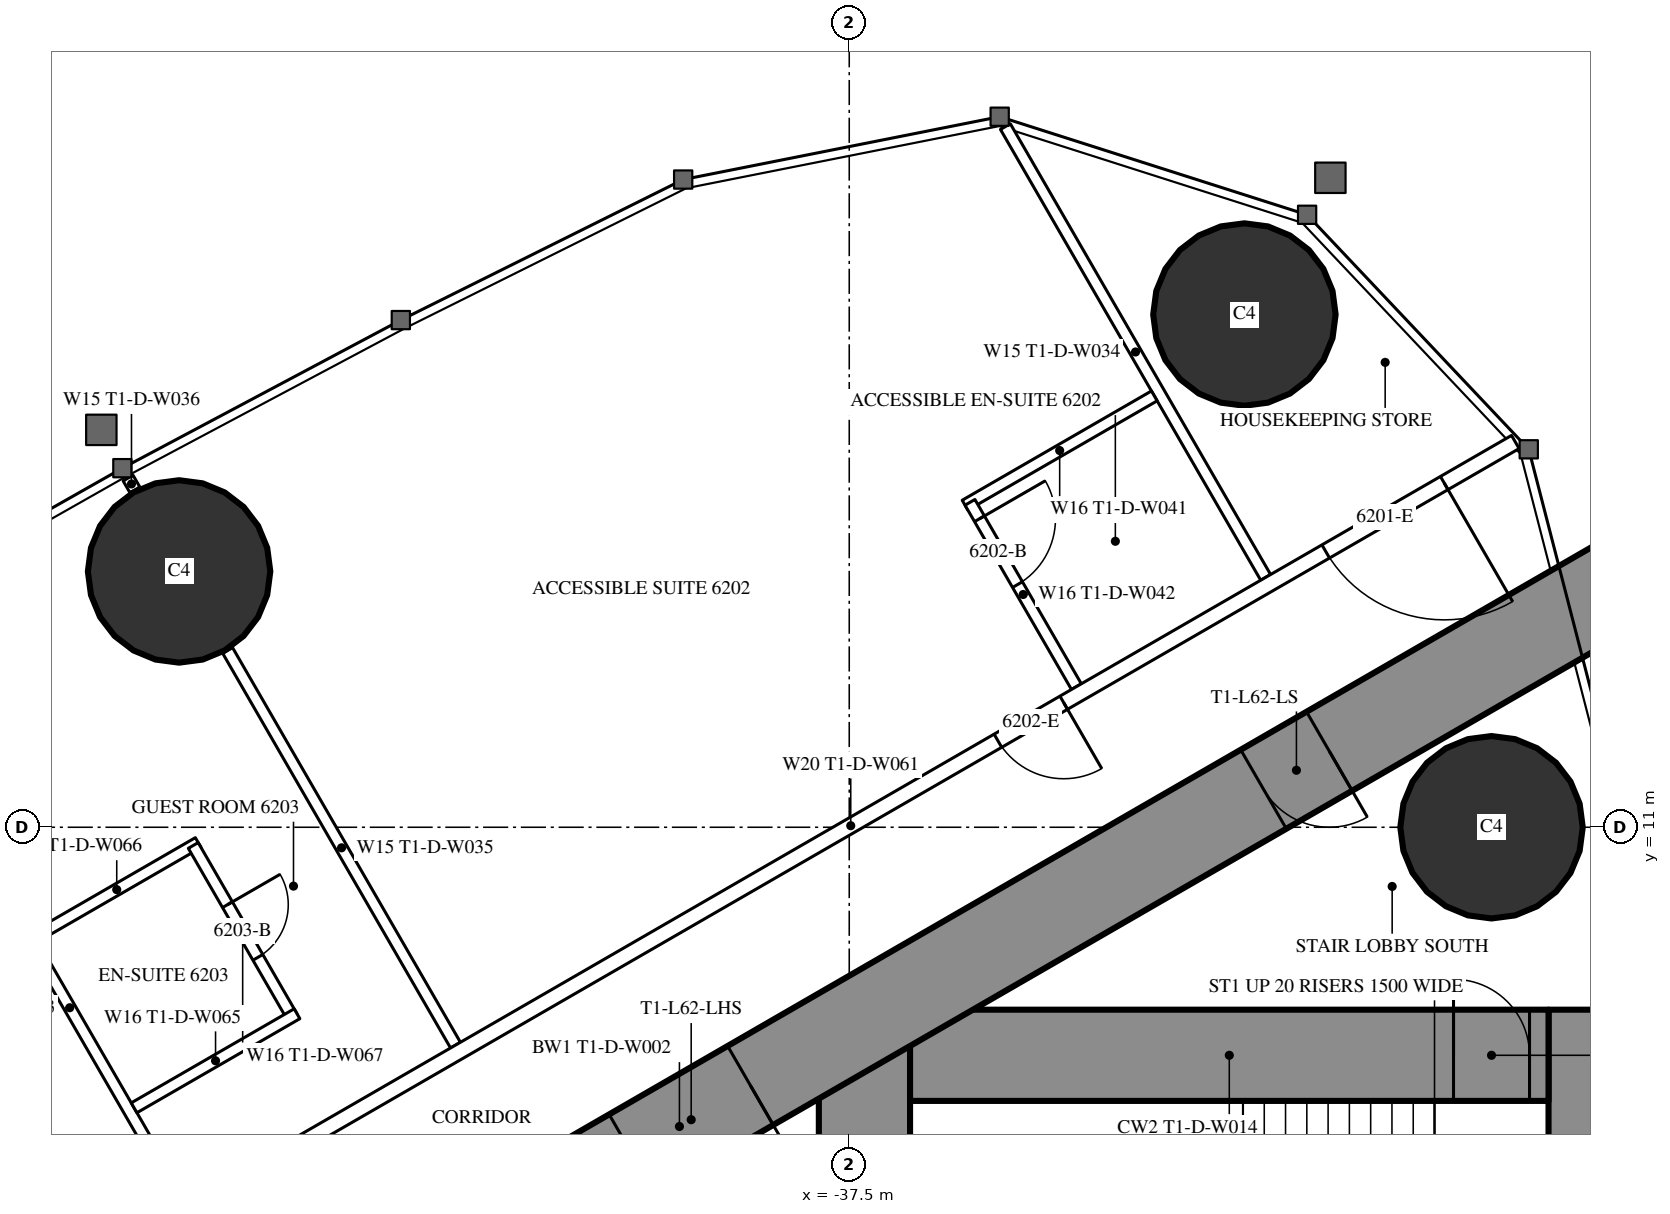
"""IFC4 building model, lengths in metres.
Left out: names, types, materials, properties, quantities, classifications, styles, units other than length and angle.
Written with IfcOpenShell. Run it as: python <this file> out.ifc"""

import sys

from ifc_helpers import new_model, si_unit, direction, frame, frame_2d, origin, origin_2d, place, context, subcontext, project, spatial, rectangle, circle, extrude, element, fill, save


model = new_model("IFC4")
c1 = context("Model", 3, precision=1e-05, world=origin(), true_north=direction((0.0, 1.0)))
c2 = subcontext(c1, "Body", "Model", "MODEL_VIEW")
j1 = project(units=[si_unit("LENGTHUNIT", "METRE"), si_unit("PLANEANGLEUNIT", "RADIAN")], contexts=[c1])
p1 = place(None, origin())
s1 = spatial("IfcSite", under=j1, at=p1, CompositionType="ELEMENT")
p2 = place(p1, origin())
s2 = spatial("IfcBuilding", under=s1, at=p2, CompositionType="ELEMENT")
p3 = place(p2, frame((0.0, 0.0, 233.3)))
s3 = spatial("IfcBuildingStorey", under=s2, at=p3, CompositionType="ELEMENT", Elevation=233.3)
for number, where, z_axis, x_axis in (
    (1, (-32.301, 17.745, 0.0), (0.0, 0.0, 1.0), (1.0, 0.0, 0.0)),
    (2, (-29.05, 11.0, 0.0), (0.0, 0.0, 1.0), (1.0, 0.0, 0.0)),
    (3, (-46.317, 14.365, 0.0), (0.0, 0.0, 1.0), (1.0, 0.0, 0.0)),
):
    element("IfcColumn", number, at=place(p3, frame(where, z_axis=z_axis, x_axis=x_axis)), inside=s3, PredefinedType="COLUMN", context=c2, shape_type="SweptSolid", body=[
        extrude(circle(Radius=1.2, at=origin_2d()), origin(), (0.0, 0.0, 1.0), 3.6),
    ])
p4 = place(p3, frame((-27.9, 8.6, 0.0), z_axis=(0.0, 0.0, 1.0), x_axis=(0.0, -1.0, 0.0)))
e4 = element("IfcWall", 4, at=p4, inside=s3, PredefinedType="SHEAR", context=c2, shape_type="SweptSolid", body=[
    extrude(rectangle(XDim=17.2, YDim=0.8, at=frame_2d((8.6, 0.0))), origin(), (0.0, 0.0, 1.0), 3.6),
])
p5 = place(p4, frame((6.95, 0.0, 0.0)))
e5 = element("IfcOpeningElement", 5, at=p5, cuts=e4, PredefinedType="OPENING", context=c2, shape_type="SweptSolid", body=[
    extrude(rectangle(XDim=0.9, YDim=2.2, at=frame_2d((0.45, 1.1))), frame((0.0, 0.41, 0.0), z_axis=(0.0, -1.0, 0.0), x_axis=(1.0, 0.0, 0.0)), (0.0, 0.0, 1.0), 0.82),
])
p6 = place(p3, frame((-37.3, 8.6, 0.0), z_axis=(0.0, 0.0, 1.0), x_axis=(0.0, -1.0, 0.0)))
e6 = element("IfcWall", 6, at=p6, inside=s3, PredefinedType="SHEAR", context=c2, shape_type="SweptSolid", body=[
    extrude(rectangle(XDim=17.2, YDim=1.2, at=frame_2d((8.6, 0.0))), origin(), (0.0, 0.0, 1.0), 3.6),
])
p7 = place(p6, frame((7.7, 0.0, 0.0)))
e7 = element("IfcOpeningElement", 7, at=p7, cuts=e6, PredefinedType="OPENING", context=c2, shape_type="SweptSolid", body=[
    extrude(rectangle(XDim=1.8, YDim=2.2, at=frame_2d((0.9, 1.1))), frame((0.0, 0.61, 0.0), z_axis=(0.0, -1.0, 0.0), x_axis=(1.0, 0.0, 0.0)), (0.0, 0.0, 1.0), 1.22),
])
p8 = place(p3, frame((-28.3, 8.0, 0.0), z_axis=(0.0, 0.0, 1.0), x_axis=(-1.0, 0.0, 0.0)))
e8 = element("IfcWall", 8, at=p8, inside=s3, PredefinedType="SHEAR", context=c2, shape_type="SweptSolid", body=[
    extrude(rectangle(XDim=8.4, YDim=1.2, at=frame_2d((4.2, 0.0))), origin(), (0.0, 0.0, 1.0), 3.6),
])
p9 = place(p8, frame((0.25, 0.0, 0.0)))
e9 = element("IfcOpeningElement", 9, at=p9, cuts=e8, PredefinedType="OPENING", context=c2, shape_type="SweptSolid", body=[
    extrude(rectangle(XDim=1.0, YDim=2.2, at=frame_2d((0.5, 1.1))), frame((0.0, 0.61, 0.0), z_axis=(0.0, -1.0, 0.0), x_axis=(1.0, 0.0, 0.0)), (0.0, 0.0, 1.0), 1.22),
])
p10 = place(p3, frame((-27.2, 14.3, 0.0), z_axis=(0.0, 0.0, 1.0), x_axis=(-0.866026593062, -0.499997940104, 0.0)))
e10 = element("IfcWall", 10, at=p10, inside=s3, PredefinedType="SHEAR", context=c2, shape_type="SweptSolid", body=[
    extrude(rectangle(XDim=28.946, YDim=1.2, at=frame_2d((14.473, 0.0))), origin(), (0.0, 0.0, 1.0), 3.6),
])
p11 = place(p10, frame((4.6, 0.0, 0.0)))
e11 = element("IfcOpeningElement", 11, at=p11, cuts=e10, PredefinedType="OPENING", context=c2, shape_type="SweptSolid", body=[
    extrude(rectangle(XDim=1.0, YDim=2.2, at=frame_2d((0.5, 1.1))), frame((0.0, 0.61, 0.0), z_axis=(0.0, -1.0, 0.0), x_axis=(1.0, 0.0, 0.0)), (0.0, 0.0, 1.0), 1.22),
])
p12 = place(p10, frame((13.395, 0.0, 0.0)))
e12 = element("IfcOpeningElement", 12, at=p12, cuts=e10, PredefinedType="OPENING", context=c2, shape_type="SweptSolid", body=[
    extrude(rectangle(XDim=1.8, YDim=2.2, at=frame_2d((0.9, 1.1))), frame((0.0, 0.61, 0.0), z_axis=(0.0, -1.0, 0.0), x_axis=(1.0, 0.0, 0.0)), (0.0, 0.0, 1.0), 1.22),
])
p13 = place(p3, frame((-32.022, 14.287, 0.0), z_axis=(0.0, 0.0, 1.0), x_axis=(-0.50000019414, 0.866025291697, 0.0)))
e13 = element("IfcWall", 13, at=p13, inside=s3, PredefinedType="PARTITIONING", context=c2, shape_type="SweptSolid", body=[
    extrude(rectangle(XDim=6.848, YDim=0.15, at=frame_2d((3.424, 0.0))), origin(), (0.0, 0.0, 1.0), 3.35),
])
p14 = place(p3, frame((-42.68, 8.134, 0.0), z_axis=(0.0, 0.0, 1.0), x_axis=(-0.499984479505, 0.866034364361, 0.0)))
e14 = element("IfcWall", 14, at=p14, inside=s3, PredefinedType="PARTITIONING", context=c2, shape_type="SweptSolid", body=[
    extrude(rectangle(XDim=5.995, YDim=0.15, at=frame_2d((2.998, 0.0))), origin(), (0.0, 0.0, 1.0), 2.45),
])
p15 = place(p3, frame((-46.898, 15.439, 0.0), z_axis=(0.0, 0.0, 1.0), x_axis=(-0.500232303069, 0.865891241997, 0.0)))
e15 = element("IfcWall", 15, at=p15, inside=s3, PredefinedType="PARTITIONING", context=c2, shape_type="SweptSolid", body=[
    extrude(rectangle(XDim=0.18, YDim=0.15, at=frame_2d((0.09, 0.0))), origin(), (0.0, 0.0, 1.0), 2.45),
])
p16 = place(p3, frame((-46.224, 5.972, 0.0), z_axis=(0.0, 0.0, 1.0), x_axis=(-0.500021351822, 0.866013075953, 0.0)))
e16 = element("IfcWall", 16, at=p16, inside=s3, PredefinedType="PARTITIONING", context=c2, shape_type="SweptSolid", body=[
    extrude(rectangle(XDim=6.128, YDim=0.15, at=frame_2d((3.064, 0.0))), origin(), (0.0, 0.0, 1.0), 2.45),
])
p17 = place(p3, frame((-33.487, 16.675, 0.0), z_axis=(0.0, 0.0, 1.0), x_axis=(-0.866039941686, -0.499974818771, 0.0)))
e17 = element("IfcWall", 17, at=p17, inside=s3, PredefinedType="PARTITIONING", context=c2, shape_type="SweptSolid", body=[
    extrude(rectangle(XDim=2.875, YDim=0.15, at=frame_2d((1.438, 0.0))), origin(), (0.0, 0.0, 1.0), 3.35),
])
p18 = place(p3, frame((-34.511, 12.85, 0.0), z_axis=(0.0, 0.0, 1.0), x_axis=(-0.500011755427, 0.866018616679, 0.0)))
e18 = element("IfcWall", 18, at=p18, inside=s3, PredefinedType="PARTITIONING", context=c2, shape_type="SweptSolid", body=[
    extrude(rectangle(XDim=2.8, YDim=0.15, at=frame_2d((1.4, 0.0))), origin(), (0.0, 0.0, 1.0), 3.35),
])
p19 = place(p18, frame((1.55, 0.0, 0.0)))
e19 = element("IfcOpeningElement", 19, at=p19, cuts=e18, PredefinedType="OPENING", context=c2, shape_type="SweptSolid", body=[
    extrude(rectangle(XDim=1.0, YDim=2.2, at=frame_2d((0.5, 1.1))), frame((0.0, 0.085, 0.0), z_axis=(0.0, -1.0, 0.0), x_axis=(1.0, 0.0, 0.0)), (0.0, 0.0, 1.0), 0.17),
])
p20 = place(p3, frame((-46.065, 10.798, 0.0), z_axis=(0.0, 0.0, 1.0), x_axis=(-0.866031185235, -0.4999899861, 0.0)))
e20 = element("IfcWall", 20, at=p20, inside=s3, PredefinedType="PARTITIONING", context=c2, shape_type="SweptSolid", body=[
    extrude(rectangle(XDim=2.475, YDim=0.15, at=frame_2d((1.238, 0.0))), origin(), (0.0, 0.0, 1.0), 3.35),
])
p21 = place(p3, frame((-44.83, 8.509, 0.0), z_axis=(0.0, 0.0, 1.0), x_axis=(-0.499936506574, 0.866062058628, 0.0)))
e21 = element("IfcWall", 21, at=p21, inside=s3, PredefinedType="PARTITIONING", context=c2, shape_type="SweptSolid", body=[
    extrude(rectangle(XDim=2.6, YDim=0.15, at=frame_2d((1.3, 0.0))), origin(), (0.0, 0.0, 1.0), 3.35),
])
p22 = place(p21, frame((0.9, 0.0, 0.0)))
e22 = element("IfcOpeningElement", 22, at=p22, cuts=e21, PredefinedType="OPENING", context=c2, shape_type="SweptSolid", body=[
    extrude(rectangle(XDim=0.8, YDim=2.2, at=frame_2d((0.4, 1.1))), frame((0.0, 0.085, 0.0), z_axis=(0.0, -1.0, 0.0), x_axis=(1.0, 0.0, 0.0)), (0.0, 0.0, 1.0), 0.17),
])
p23 = place(p3, frame((-44.765, 8.546, 0.0), z_axis=(0.0, 0.0, 1.0), x_axis=(-0.86604923931, -0.499958713387, 0.0)))
e23 = element("IfcWall", 23, at=p23, inside=s3, PredefinedType="PARTITIONING", context=c2, shape_type="SweptSolid", body=[
    extrude(rectangle(XDim=2.475, YDim=0.15, at=frame_2d((1.237, 0.0))), origin(), (0.0, 0.0, 1.0), 3.35),
])
p24 = place(p3, frame((-28.737, 16.068, 0.0), z_axis=(0.0, 0.0, 1.0), x_axis=(-0.866023901326, -0.500002602325, 0.0)))
e24 = element("IfcWall", 24, at=p24, inside=s3, PredefinedType="PARTITIONING", context=c2, shape_type="SweptSolid", body=[
    extrude(rectangle(XDim=20.192, YDim=0.2, at=frame_2d((10.096, 0.0))), origin(), (0.0, 0.0, 1.0), 3.35),
])
p25 = place(p24, frame((1.08, 0.0, 0.0)))
e25 = element("IfcOpeningElement", 25, at=p25, cuts=e24, PredefinedType="OPENING", context=c2, shape_type="SweptSolid", body=[
    extrude(rectangle(XDim=1.8, YDim=2.03, at=frame_2d((0.9, 1.015))), frame((0.0, 0.11, 0.0), z_axis=(0.0, -1.0, 0.0), x_axis=(1.0, 0.0, 0.0)), (0.0, 0.0, 1.0), 0.22),
])
p26 = place(p24, frame((6.86, 0.0, 0.0)))
e26 = element("IfcOpeningElement", 26, at=p26, cuts=e24, PredefinedType="OPENING", context=c2, shape_type="SweptSolid", body=[
    extrude(rectangle(XDim=1.0, YDim=2.2, at=frame_2d((0.5, 1.1))), frame((0.0, 0.11, 0.0), z_axis=(0.0, -1.0, 0.0), x_axis=(1.0, 0.0, 0.0)), (0.0, 0.0, 1.0), 0.22),
])
p27 = place(p24, frame((18.867, 0.0, 0.0)))
e27 = element("IfcOpeningElement", 27, at=p27, cuts=e24, PredefinedType="OPENING", context=c2, shape_type="SweptSolid", body=[
    extrude(rectangle(XDim=0.95, YDim=2.2, at=frame_2d((0.475, 1.1))), frame((0.0, 0.11, 0.0), z_axis=(0.0, -1.0, 0.0), x_axis=(1.0, 0.0, 0.0)), (0.0, 0.0, 1.0), 0.22),
])
p28 = place(p25, origin())
e28 = element("IfcDoor", 28, at=p28, inside=s3, OperationType="DOUBLE_DOOR_SINGLE_SWING", PredefinedType="DOOR", context=c2, shape_type="SweptSolid", body=[
    extrude(rectangle(XDim=1.8, YDim=2.03, at=frame_2d((0.9, 1.015))), frame((0.0, 0.025, 0.0), z_axis=(0.0, -1.0, 0.0), x_axis=(1.0, 0.0, 0.0)), (0.0, 0.0, 1.0), 0.05),
])
fill(e25, e28)
p29 = place(p19, origin())
e29 = element("IfcDoor", 29, at=p29, inside=s3, OperationType="SINGLE_SWING_RIGHT", PredefinedType="DOOR", context=c2, shape_type="SweptSolid", body=[
    extrude(rectangle(XDim=1.0, YDim=2.2, at=frame_2d((0.5, 1.1))), frame((0.0, 0.025, 0.0), z_axis=(0.0, -1.0, 0.0), x_axis=(1.0, 0.0, 0.0)), (0.0, 0.0, 1.0), 0.05),
])
fill(e19, e29)
p30 = place(p26, origin())
e30 = element("IfcDoor", 30, at=p30, inside=s3, OperationType="SINGLE_SWING_LEFT", PredefinedType="DOOR", context=c2, shape_type="SweptSolid", body=[
    extrude(rectangle(XDim=1.0, YDim=2.2, at=frame_2d((0.5, 1.1))), frame((0.0, 0.025, 0.0), z_axis=(0.0, -1.0, 0.0), x_axis=(1.0, 0.0, 0.0)), (0.0, 0.0, 1.0), 0.05),
])
fill(e26, e30)
p31 = place(p22, origin())
e31 = element("IfcDoor", 31, at=p31, inside=s3, OperationType="SINGLE_SWING_RIGHT", PredefinedType="DOOR", context=c2, shape_type="SweptSolid", body=[
    extrude(rectangle(XDim=0.8, YDim=2.2, at=frame_2d((0.4, 1.1))), frame((0.0, 0.025, 0.0), z_axis=(0.0, -1.0, 0.0), x_axis=(1.0, 0.0, 0.0)), (0.0, 0.0, 1.0), 0.05),
])
fill(e22, e31)
p32 = place(p11, origin())
e32 = element("IfcDoor", 32, at=p32, inside=s3, OperationType="SINGLE_SWING_LEFT", PredefinedType="DOOR", context=c2, shape_type="SweptSolid", body=[
    extrude(rectangle(XDim=1.0, YDim=2.2, at=frame_2d((0.5, 1.1))), frame((0.0, 0.025, 0.0), z_axis=(0.0, -1.0, 0.0), x_axis=(1.0, 0.0, 0.0)), (0.0, 0.0, 1.0), 0.05),
])
fill(e11, e32)
p33 = place(p12, origin())
e33 = element("IfcDoor", 33, at=p33, inside=s3, OperationType="DOUBLE_DOOR_SINGLE_SWING", PredefinedType="DOOR", context=c2, shape_type="SweptSolid", body=[
    extrude(rectangle(XDim=1.8, YDim=2.2, at=frame_2d((0.9, 1.1))), frame((0.0, 0.025, 0.0), z_axis=(0.0, -1.0, 0.0), x_axis=(1.0, 0.0, 0.0)), (0.0, 0.0, 1.0), 0.05),
])
fill(e12, e33)
p34 = place(p9, origin())
e34 = element("IfcDoor", 34, at=p34, inside=s3, OperationType="SINGLE_SWING_RIGHT", PredefinedType="DOOR", context=c2, shape_type="SweptSolid", body=[
    extrude(rectangle(XDim=1.0, YDim=2.2, at=frame_2d((0.5, 1.1))), frame((0.0, 0.025, 0.0), z_axis=(0.0, -1.0, 0.0), x_axis=(1.0, 0.0, 0.0)), (0.0, 0.0, 1.0), 0.05),
])
fill(e9, e34)
save(model, sys.argv[1])
